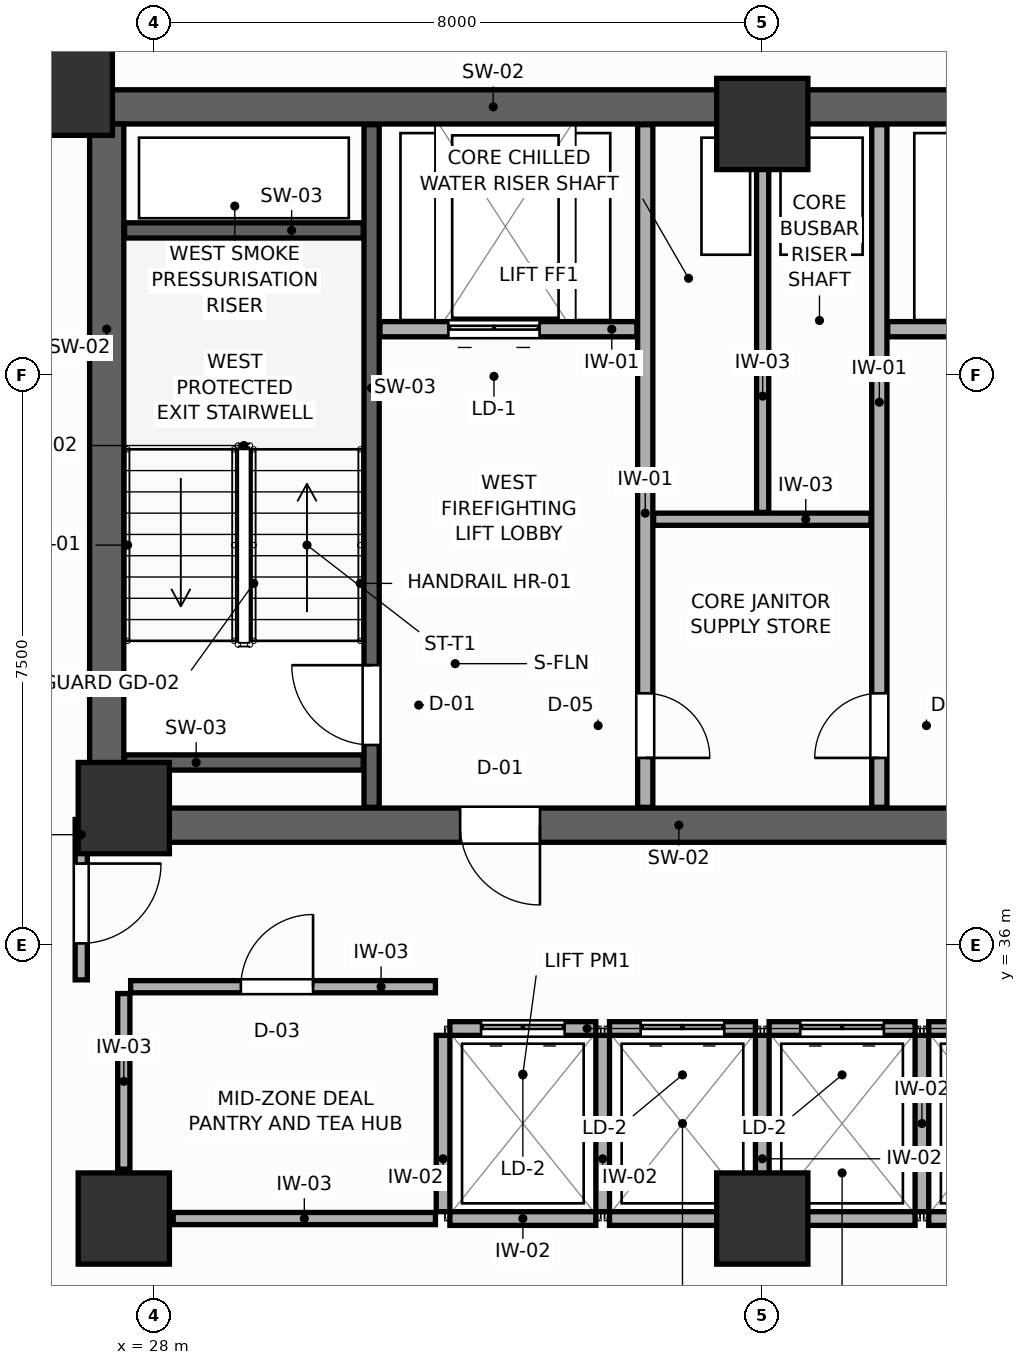
"""IFC4 building model, lengths in metres.
Left out: names, types, materials, properties, quantities, classifications, styles, units other than length and angle.
Written with IfcOpenShell. Run it as: python <this file> out.ifc"""

import sys

from ifc_helpers import new_model, si_unit, direction, frame, frame_2d, origin, origin_2d, place, context, subcontext, project, spatial, rectangle, extrude, source, transform, mapped, element, fill, save


model = new_model("IFC4")
c1 = context("Model", 3, precision=1e-05, world=origin(), true_north=direction((0.0, 1.0)))
c2 = subcontext(c1, "Body", "Model", "MODEL_VIEW")
j1 = project(units=[si_unit("LENGTHUNIT", "METRE"), si_unit("PLANEANGLEUNIT", "RADIAN")], contexts=[c1])
p1 = place(None, origin())
s1 = spatial("IfcSite", under=j1, at=p1, CompositionType="ELEMENT")
p2 = place(p1, origin())
s2 = spatial("IfcBuilding", under=s1, at=p2, CompositionType="ELEMENT")
p3 = place(p2, frame((0.0, 0.0, 168.6)))
s3 = spatial("IfcBuildingStorey", under=s2, at=p3, CompositionType="ELEMENT", Elevation=168.6)
p4 = place(p3, frame((27.15, 47.025, 0.0), z_axis=(0.0, 0.0, 1.0), x_axis=(1.0, 0.0, 0.0)))
e1 = element("IfcWall", 1, at=p4, inside=s3, PredefinedType="SHEAR", context=c2, shape_type="SweptSolid", body=[
    extrude(rectangle(XDim=17.7, YDim=0.45, at=frame_2d((8.85, 0.0))), origin(), (0.0, 0.0, 1.0), 3.6),
])
p5 = place(p3, frame((27.15, 37.575, 0.0), z_axis=(0.0, 0.0, 1.0), x_axis=(1.0, 0.0, 0.0)))
e2 = element("IfcWall", 2, at=p5, inside=s3, PredefinedType="SHEAR", context=c2, shape_type="SweptSolid", body=[
    extrude(rectangle(XDim=17.7, YDim=0.45, at=frame_2d((8.85, 0.0))), origin(), (0.0, 0.0, 1.0), 3.6),
])
p6 = place(p5, frame((4.875, 0.0, 0.0)))
e3 = element("IfcOpeningElement", 3, at=p6, cuts=e2, PredefinedType="OPENING", context=c2, shape_type="SweptSolid", body=[
    extrude(rectangle(XDim=1.05, YDim=2.1, at=frame_2d((0.525, 1.05))), frame((0.0, 0.235, 0.0), z_axis=(0.0, -1.0, 0.0), x_axis=(1.0, 0.0, 0.0)), (0.0, 0.0, 1.0), 0.47),
])
p7 = place(p5, frame((11.775, 0.0, 0.0)))
e4 = element("IfcOpeningElement", 4, at=p7, cuts=e2, PredefinedType="OPENING", context=c2, shape_type="SweptSolid", body=[
    extrude(rectangle(XDim=1.05, YDim=2.1, at=frame_2d((0.525, 1.05))), frame((0.0, 0.235, 0.0), z_axis=(0.0, -1.0, 0.0), x_axis=(1.0, 0.0, 0.0)), (0.0, 0.0, 1.0), 0.47),
])
p8 = place(p3, frame((27.375, 37.8, 0.0), z_axis=(0.0, 0.0, 1.0), x_axis=(0.0, 1.0, 0.0)))
e5 = element("IfcWall", 5, at=p8, inside=s3, PredefinedType="SHEAR", context=c2, shape_type="SweptSolid", body=[
    extrude(rectangle(XDim=9.0, YDim=0.45, at=frame_2d((4.5, 0.0))), origin(), (0.0, 0.0, 1.0), 3.6),
])
m1 = source(origin(), c2, "Body", "SweptSolid", [
    extrude(rectangle(XDim=1.2, YDim=1.2, at=origin_2d()), origin(), (0.0, 0.0, 1.0), 3.6),
])
for number, where, z_axis, x_axis in (
    (6, (26.85, 47.25, 0.0), (0.0, 0.0, 1.0), (1.0, 0.0, 0.0)),
    (7, (27.6, 37.8, 0.0), (0.0, 0.0, 1.0), (1.0, 0.0, 0.0)),
    (8, (27.6, 32.4, 0.0), (0.0, 0.0, 1.0), (1.0, 0.0, 0.0)),
    (9, (36.0, 46.8, 0.0), (0.0, 0.0, 1.0), (1.0, 0.0, 0.0)),
    (10, (36.0, 32.4, 0.0), (0.0, 0.0, 1.0), (1.0, 0.0, 0.0)),
):
    element("IfcColumn", number, at=place(p3, frame(where, z_axis=z_axis, x_axis=x_axis)), inside=s3, PredefinedType="COLUMN", context=c2, shape_type="MappedRepresentation", body=[
        mapped(m1, transform((0.0, 0.0, 0.0), scale=1.0)),
    ])
p9 = place(p3, frame((30.86, 37.81, 0.0), z_axis=(0.0, 0.0, 1.0), x_axis=(0.0, 1.0, 0.0)))
e11 = element("IfcWall", 11, at=p9, inside=s3, PredefinedType="SHEAR", context=c2, shape_type="SweptSolid", body=[
    extrude(rectangle(XDim=8.98, YDim=0.2, at=frame_2d((4.49, 0.0))), origin(), (0.0, 0.0, 1.0), 3.6),
])
p10 = place(p9, frame((0.82, 0.0, 0.0)))
e12 = element("IfcOpeningElement", 12, at=p10, cuts=e11, PredefinedType="OPENING", context=c2, shape_type="SweptSolid", body=[
    extrude(rectangle(XDim=1.05, YDim=2.1, at=frame_2d((0.525, 1.05))), frame((0.0, 0.11, 0.0), z_axis=(0.0, -1.0, 0.0), x_axis=(1.0, 0.0, 0.0)), (0.0, 0.0, 1.0), 0.22),
])
for number, where, z_axis, x_axis in (
    (13, (27.61, 45.4, 0.0), (0.0, 0.0, 1.0), (1.0, 0.0, 0.0)),
    (14, (27.61, 38.4, 0.0), (0.0, 0.0, 1.0), (1.0, 0.0, 0.0)),
):
    element("IfcWall", number, at=place(p3, frame(where, z_axis=z_axis, x_axis=x_axis)), inside=s3, PredefinedType="SHEAR", context=c2, shape_type="SweptSolid", body=[
        extrude(rectangle(XDim=3.14, YDim=0.2, at=frame_2d((1.57, 0.0))), origin(), (0.0, 0.0, 1.0), 3.6),
    ])
p11 = place(p3, frame((30.97, 44.1, 0.0), z_axis=(0.0, 0.0, 1.0), x_axis=(1.0, 0.0, 0.0)))
e15 = element("IfcWall", 15, at=p11, inside=s3, PredefinedType="PARTITIONING", context=c2, shape_type="SweptSolid", body=[
    extrude(rectangle(XDim=3.38, YDim=0.2, at=frame_2d((1.69, 0.0))), origin(), (0.0, 0.0, 1.0), 3.4),
])
p12 = place(p11, frame((0.9, 0.0, 0.0)))
e16 = element("IfcOpeningElement", 16, at=p12, cuts=e15, PredefinedType="OPENING", context=c2, shape_type="SweptSolid", body=[
    extrude(rectangle(XDim=1.2, YDim=2.1, at=frame_2d((0.6, 1.05))), frame((0.0, 0.11, 0.0), z_axis=(0.0, -1.0, 0.0), x_axis=(1.0, 0.0, 0.0)), (0.0, 0.0, 1.0), 0.22),
])
p13 = place(p3, frame((37.65, 44.1, 0.0), z_axis=(0.0, 0.0, 1.0), x_axis=(1.0, 0.0, 0.0)))
e17 = element("IfcWall", 17, at=p13, inside=s3, PredefinedType="PARTITIONING", context=c2, shape_type="SweptSolid", body=[
    extrude(rectangle(XDim=3.38, YDim=0.2, at=frame_2d((1.69, 0.0))), origin(), (0.0, 0.0, 1.0), 3.4),
])
p14 = place(p13, frame((1.0, 0.0, 0.0)))
e18 = element("IfcOpeningElement", 18, at=p14, cuts=e17, PredefinedType="OPENING", context=c2, shape_type="SweptSolid", body=[
    extrude(rectangle(XDim=1.2, YDim=2.1, at=frame_2d((0.6, 1.05))), frame((0.0, 0.11, 0.0), z_axis=(0.0, -1.0, 0.0), x_axis=(1.0, 0.0, 0.0)), (0.0, 0.0, 1.0), 0.22),
])
p15 = place(p3, frame((34.46, 37.81, 0.0), z_axis=(0.0, 0.0, 1.0), x_axis=(0.0, 1.0, 0.0)))
e19 = element("IfcWall", 19, at=p15, inside=s3, PredefinedType="PARTITIONING", context=c2, shape_type="SweptSolid", body=[
    extrude(rectangle(XDim=8.98, YDim=0.2, at=frame_2d((4.49, 0.0))), origin(), (0.0, 0.0, 1.0), 3.4),
])
p16 = place(p15, frame((0.65, 0.0, 0.0)))
e20 = element("IfcOpeningElement", 20, at=p16, cuts=e19, PredefinedType="OPENING", context=c2, shape_type="SweptSolid", body=[
    extrude(rectangle(XDim=0.85, YDim=2.05, at=frame_2d((0.425, 1.025))), frame((0.0, 0.11, 0.0), z_axis=(0.0, -1.0, 0.0), x_axis=(1.0, 0.0, 0.0)), (0.0, 0.0, 1.0), 0.22),
])
p17 = place(p3, frame((37.54, 37.81, 0.0), z_axis=(0.0, 0.0, 1.0), x_axis=(0.0, 1.0, 0.0)))
e21 = element("IfcWall", 21, at=p17, inside=s3, PredefinedType="PARTITIONING", context=c2, shape_type="SweptSolid", body=[
    extrude(rectangle(XDim=8.98, YDim=0.2, at=frame_2d((4.49, 0.0))), origin(), (0.0, 0.0, 1.0), 3.4),
])
p18 = place(p17, frame((0.65, 0.0, 0.0)))
e22 = element("IfcOpeningElement", 22, at=p18, cuts=e21, PredefinedType="OPENING", context=c2, shape_type="SweptSolid", body=[
    extrude(rectangle(XDim=0.85, YDim=2.05, at=frame_2d((0.425, 1.025))), frame((0.0, 0.11, 0.0), z_axis=(0.0, -1.0, 0.0), x_axis=(1.0, 0.0, 0.0)), (0.0, 0.0, 1.0), 0.22),
])
p19 = place(p3, frame((34.57, 41.6, 0.0), z_axis=(0.0, 0.0, 1.0), x_axis=(1.0, 0.0, 0.0)))
e23 = element("IfcWall", 23, at=p19, inside=s3, PredefinedType="PARTITIONING", context=c2, shape_type="SweptSolid", body=[
    extrude(rectangle(XDim=2.86, YDim=0.16, at=frame_2d((1.43, 0.0))), origin(), (0.0, 0.0, 1.0), 3.4),
])
p20 = place(p3, frame((36.005, 41.69, 0.0), z_axis=(0.0, 0.0, 1.0), x_axis=(0.0, 1.0, 0.0)))
e24 = element("IfcWall", 24, at=p20, inside=s3, PredefinedType="PARTITIONING", context=c2, shape_type="SweptSolid", body=[
    extrude(rectangle(XDim=5.1, YDim=0.16, at=frame_2d((2.55, 0.0))), origin(), (0.0, 0.0, 1.0), 3.4),
])
p21 = place(p3, frame((31.89, 34.9, 0.0), z_axis=(0.0, 0.0, 1.0), x_axis=(1.0, 0.0, 0.0)))
e25 = element("IfcWall", 25, at=p21, inside=s3, PredefinedType="PARTITIONING", context=c2, shape_type="SweptSolid", body=[
    extrude(rectangle(XDim=1.92, YDim=0.18, at=frame_2d((0.96, 0.0))), origin(), (0.0, 0.0, 1.0), 3.4),
])
p22 = place(p21, frame((0.41, 0.0, 0.0)))
e26 = element("IfcOpeningElement", 26, at=p22, cuts=e25, PredefinedType="OPENING", context=c2, shape_type="SweptSolid", body=[
    extrude(rectangle(XDim=1.1, YDim=2.1, at=frame_2d((0.55, 1.05))), frame((0.0, 0.1, 0.0), z_axis=(0.0, -1.0, 0.0), x_axis=(1.0, 0.0, 0.0)), (0.0, 0.0, 1.0), 0.2),
])
p23 = place(p3, frame((31.89, 32.4, 0.0), z_axis=(0.0, 0.0, 1.0), x_axis=(1.0, 0.0, 0.0)))
e27 = element("IfcWall", 27, at=p23, inside=s3, PredefinedType="PARTITIONING", context=c2, shape_type="SweptSolid", body=[
    extrude(rectangle(XDim=1.92, YDim=0.18, at=frame_2d((0.96, 0.0))), origin(), (0.0, 0.0, 1.0), 2.95),
])
p24 = place(p3, frame((31.8, 32.49, 0.0), z_axis=(0.0, 0.0, 1.0), x_axis=(0.0, 1.0, 0.0)))
e28 = element("IfcWall", 28, at=p24, inside=s3, PredefinedType="PARTITIONING", context=c2, shape_type="SweptSolid", body=[
    extrude(rectangle(XDim=2.32, YDim=0.18, at=frame_2d((1.16, 0.0))), origin(), (0.0, 0.0, 1.0), 3.4),
])
p25 = place(p3, frame((33.99, 34.9, 0.0), z_axis=(0.0, 0.0, 1.0), x_axis=(1.0, 0.0, 0.0)))
e29 = element("IfcWall", 29, at=p25, inside=s3, PredefinedType="PARTITIONING", context=c2, shape_type="SweptSolid", body=[
    extrude(rectangle(XDim=1.92, YDim=0.18, at=frame_2d((0.96, 0.0))), origin(), (0.0, 0.0, 1.0), 3.4),
])
p26 = place(p25, frame((0.41, 0.0, 0.0)))
e30 = element("IfcOpeningElement", 30, at=p26, cuts=e29, PredefinedType="OPENING", context=c2, shape_type="SweptSolid", body=[
    extrude(rectangle(XDim=1.1, YDim=2.1, at=frame_2d((0.55, 1.05))), frame((0.0, 0.1, 0.0), z_axis=(0.0, -1.0, 0.0), x_axis=(1.0, 0.0, 0.0)), (0.0, 0.0, 1.0), 0.2),
])
p27 = place(p3, frame((33.99, 32.4, 0.0), z_axis=(0.0, 0.0, 1.0), x_axis=(1.0, 0.0, 0.0)))
e31 = element("IfcWall", 31, at=p27, inside=s3, PredefinedType="PARTITIONING", context=c2, shape_type="SweptSolid", body=[
    extrude(rectangle(XDim=1.92, YDim=0.18, at=frame_2d((0.96, 0.0))), origin(), (0.0, 0.0, 1.0), 2.95),
])
p28 = place(p3, frame((33.9, 32.49, 0.0), z_axis=(0.0, 0.0, 1.0), x_axis=(0.0, 1.0, 0.0)))
e32 = element("IfcWall", 32, at=p28, inside=s3, PredefinedType="PARTITIONING", context=c2, shape_type="SweptSolid", body=[
    extrude(rectangle(XDim=2.32, YDim=0.18, at=frame_2d((1.16, 0.0))), origin(), (0.0, 0.0, 1.0), 3.4),
])
p29 = place(p3, frame((36.09, 34.9, 0.0), z_axis=(0.0, 0.0, 1.0), x_axis=(1.0, 0.0, 0.0)))
e33 = element("IfcWall", 33, at=p29, inside=s3, PredefinedType="PARTITIONING", context=c2, shape_type="SweptSolid", body=[
    extrude(rectangle(XDim=1.92, YDim=0.18, at=frame_2d((0.96, 0.0))), origin(), (0.0, 0.0, 1.0), 3.4),
])
p30 = place(p29, frame((0.41, 0.0, 0.0)))
e34 = element("IfcOpeningElement", 34, at=p30, cuts=e33, PredefinedType="OPENING", context=c2, shape_type="SweptSolid", body=[
    extrude(rectangle(XDim=1.1, YDim=2.1, at=frame_2d((0.55, 1.05))), frame((0.0, 0.1, 0.0), z_axis=(0.0, -1.0, 0.0), x_axis=(1.0, 0.0, 0.0)), (0.0, 0.0, 1.0), 0.2),
])
p31 = place(p3, frame((36.09, 32.4, 0.0), z_axis=(0.0, 0.0, 1.0), x_axis=(1.0, 0.0, 0.0)))
e35 = element("IfcWall", 35, at=p31, inside=s3, PredefinedType="PARTITIONING", context=c2, shape_type="SweptSolid", body=[
    extrude(rectangle(XDim=1.92, YDim=0.18, at=frame_2d((0.96, 0.0))), origin(), (0.0, 0.0, 1.0), 2.95),
])
p32 = place(p3, frame((36.0, 32.49, 0.0), z_axis=(0.0, 0.0, 1.0), x_axis=(0.0, 1.0, 0.0)))
e36 = element("IfcWall", 36, at=p32, inside=s3, PredefinedType="PARTITIONING", context=c2, shape_type="SweptSolid", body=[
    extrude(rectangle(XDim=2.32, YDim=0.18, at=frame_2d((1.16, 0.0))), origin(), (0.0, 0.0, 1.0), 3.4),
])
p33 = place(p3, frame((38.19, 34.9, 0.0), z_axis=(0.0, 0.0, 1.0), x_axis=(1.0, 0.0, 0.0)))
e37 = element("IfcWall", 37, at=p33, inside=s3, PredefinedType="PARTITIONING", context=c2, shape_type="SweptSolid", body=[
    extrude(rectangle(XDim=1.92, YDim=0.18, at=frame_2d((0.96, 0.0))), origin(), (0.0, 0.0, 1.0), 3.4),
])
p34 = place(p33, frame((0.41, 0.0, 0.0)))
e38 = element("IfcOpeningElement", 38, at=p34, cuts=e37, PredefinedType="OPENING", context=c2, shape_type="SweptSolid", body=[
    extrude(rectangle(XDim=1.1, YDim=2.1, at=frame_2d((0.55, 1.05))), frame((0.0, 0.1, 0.0), z_axis=(0.0, -1.0, 0.0), x_axis=(1.0, 0.0, 0.0)), (0.0, 0.0, 1.0), 0.2),
])
p35 = place(p3, frame((38.19, 32.4, 0.0), z_axis=(0.0, 0.0, 1.0), x_axis=(1.0, 0.0, 0.0)))
e39 = element("IfcWall", 39, at=p35, inside=s3, PredefinedType="PARTITIONING", context=c2, shape_type="SweptSolid", body=[
    extrude(rectangle(XDim=1.92, YDim=0.18, at=frame_2d((0.96, 0.0))), origin(), (0.0, 0.0, 1.0), 2.95),
])
p36 = place(p3, frame((38.1, 32.49, 0.0), z_axis=(0.0, 0.0, 1.0), x_axis=(0.0, 1.0, 0.0)))
e40 = element("IfcWall", 40, at=p36, inside=s3, PredefinedType="PARTITIONING", context=c2, shape_type="SweptSolid", body=[
    extrude(rectangle(XDim=2.32, YDim=0.18, at=frame_2d((1.16, 0.0))), origin(), (0.0, 0.0, 1.0), 3.4),
])
p37 = place(p3, frame((28.25, 32.4, 0.0), z_axis=(0.0, 0.0, 1.0), x_axis=(1.0, 0.0, 0.0)))
e41 = element("IfcWall", 41, at=p37, inside=s3, PredefinedType="PARTITIONING", context=c2, shape_type="SweptSolid", body=[
    extrude(rectangle(XDim=3.45, YDim=0.16, at=frame_2d((1.725, 0.0))), origin(), (0.0, 0.0, 1.0), 2.95),
])
p38 = place(p3, frame((27.6, 33.05, 0.0), z_axis=(0.0, 0.0, 1.0), x_axis=(0.0, 1.0, 0.0)))
e42 = element("IfcWall", 42, at=p38, inside=s3, PredefinedType="PARTITIONING", context=c2, shape_type="SweptSolid", body=[
    extrude(rectangle(XDim=2.31, YDim=0.16, at=frame_2d((1.155, 0.0))), origin(), (0.0, 0.0, 1.0), 3.4),
])
p39 = place(p3, frame((27.69, 35.45, 0.0), z_axis=(0.0, 0.0, 1.0), x_axis=(1.0, 0.0, 0.0)))
e43 = element("IfcWall", 43, at=p39, inside=s3, PredefinedType="PARTITIONING", context=c2, shape_type="SweptSolid", body=[
    extrude(rectangle(XDim=4.01, YDim=0.16, at=frame_2d((2.005, 0.0))), origin(), (0.0, 0.0, 1.0), 3.4),
])
p40 = place(p39, frame((1.45, 0.0, 0.0)))
e44 = element("IfcOpeningElement", 44, at=p40, cuts=e43, PredefinedType="OPENING", context=c2, shape_type="SweptSolid", body=[
    extrude(rectangle(XDim=0.95, YDim=2.05, at=frame_2d((0.475, 1.025))), frame((0.0, 0.09, 0.0), z_axis=(0.0, -1.0, 0.0), x_axis=(1.0, 0.0, 0.0)), (0.0, 0.0, 1.0), 0.18),
])
p41 = place(p3, frame((27.04, 35.54, 0.0), z_axis=(0.0, 0.0, 1.0), x_axis=(0.0, 1.0, 0.0)))
e45 = element("IfcWall", 45, at=p41, inside=s3, PredefinedType="PARTITIONING", context=c2, shape_type="SweptSolid", body=[
    extrude(rectangle(XDim=2.11, YDim=0.16, at=frame_2d((1.055, 0.0))), origin(), (0.0, 0.0, 1.0), 3.4),
])
p42 = place(p41, frame((0.48, 0.0, 0.0)))
e46 = element("IfcOpeningElement", 46, at=p42, cuts=e45, PredefinedType="OPENING", context=c2, shape_type="SweptSolid", body=[
    extrude(rectangle(XDim=1.05, YDim=2.1, at=frame_2d((0.525, 1.05))), frame((0.0, 0.09, 0.0), z_axis=(0.0, -1.0, 0.0), x_axis=(1.0, 0.0, 0.0)), (0.0, 0.0, 1.0), 0.18),
])
p43 = place(p3, frame((27.035, 47.34, 0.0), z_axis=(0.0, 0.0, 1.0), x_axis=(0.0, 1.0, 0.0)))
e47 = element("IfcWall", 47, at=p43, inside=s3, PredefinedType="PARTITIONING", context=c2, shape_type="SweptSolid", body=[
    extrude(rectangle(XDim=4.518, YDim=0.16, at=frame_2d((2.259, 0.0))), origin(), (0.0, 0.0, 1.0), 3.4),
])
p44 = place(p43, frame((2.663, 0.0, 0.0)))
e48 = element("IfcOpeningElement", 48, at=p44, cuts=e47, PredefinedType="OPENING", context=c2, shape_type="SweptSolid", body=[
    extrude(rectangle(XDim=0.95, YDim=2.05, at=frame_2d((0.475, 1.025))), frame((0.0, 0.09, 0.0), z_axis=(0.0, -1.0, 0.0), x_axis=(1.0, 0.0, 0.0)), (0.0, 0.0, 1.0), 0.18),
])
p45 = place(p10, origin())
e49 = element("IfcDoor", 49, at=p45, inside=s3, OperationType="SINGLE_SWING_RIGHT", PredefinedType="DOOR", context=c2, shape_type="SweptSolid", body=[
    extrude(rectangle(XDim=1.05, YDim=2.1, at=frame_2d((0.525, 1.05))), frame((0.0, 0.025, 0.0), z_axis=(0.0, -1.0, 0.0), x_axis=(1.0, 0.0, 0.0)), (0.0, 0.0, 1.0), 0.05),
])
fill(e12, e49)
p46 = place(p12, origin())
e50 = element("IfcDoor", 50, at=p46, inside=s3, OperationType="DOUBLE_DOOR_SLIDING", PredefinedType="DOOR", context=c2, shape_type="SweptSolid", body=[
    extrude(rectangle(XDim=1.2, YDim=2.1, at=frame_2d((0.6, 1.05))), frame((0.0, 0.025, 0.0), z_axis=(0.0, -1.0, 0.0), x_axis=(1.0, 0.0, 0.0)), (0.0, 0.0, 1.0), 0.05),
])
fill(e16, e50)
p47 = place(p16, frame((0.85, 0.0, 0.0), z_axis=(0.0, 0.0, 1.0), x_axis=(-1.0, 0.0, 0.0)))
e51 = element("IfcDoor", 51, at=p47, inside=s3, OperationType="SINGLE_SWING_RIGHT", PredefinedType="DOOR", context=c2, shape_type="SweptSolid", body=[
    extrude(rectangle(XDim=0.85, YDim=2.05, at=frame_2d((0.425, 1.025))), frame((0.0, 0.025, 0.0), z_axis=(0.0, -1.0, 0.0), x_axis=(1.0, 0.0, 0.0)), (0.0, 0.0, 1.0), 0.05),
])
fill(e20, e51)
p48 = place(p18, origin())
e52 = element("IfcDoor", 52, at=p48, inside=s3, OperationType="SINGLE_SWING_LEFT", PredefinedType="DOOR", context=c2, shape_type="SweptSolid", body=[
    extrude(rectangle(XDim=0.85, YDim=2.05, at=frame_2d((0.425, 1.025))), frame((0.0, 0.025, 0.0), z_axis=(0.0, -1.0, 0.0), x_axis=(1.0, 0.0, 0.0)), (0.0, 0.0, 1.0), 0.05),
])
fill(e22, e52)
p49 = place(p22, origin())
e53 = element("IfcDoor", 53, at=p49, inside=s3, OperationType="DOUBLE_DOOR_SLIDING", PredefinedType="DOOR", context=c2, shape_type="SweptSolid", body=[
    extrude(rectangle(XDim=1.1, YDim=2.1, at=frame_2d((0.55, 1.05))), frame((0.0, 0.025, 0.0), z_axis=(0.0, -1.0, 0.0), x_axis=(1.0, 0.0, 0.0)), (0.0, 0.0, 1.0), 0.05),
])
fill(e26, e53)
p50 = place(p26, origin())
e54 = element("IfcDoor", 54, at=p50, inside=s3, OperationType="DOUBLE_DOOR_SLIDING", PredefinedType="DOOR", context=c2, shape_type="SweptSolid", body=[
    extrude(rectangle(XDim=1.1, YDim=2.1, at=frame_2d((0.55, 1.05))), frame((0.0, 0.025, 0.0), z_axis=(0.0, -1.0, 0.0), x_axis=(1.0, 0.0, 0.0)), (0.0, 0.0, 1.0), 0.05),
])
fill(e30, e54)
p51 = place(p30, origin())
e55 = element("IfcDoor", 55, at=p51, inside=s3, OperationType="DOUBLE_DOOR_SLIDING", PredefinedType="DOOR", context=c2, shape_type="SweptSolid", body=[
    extrude(rectangle(XDim=1.1, YDim=2.1, at=frame_2d((0.55, 1.05))), frame((0.0, 0.025, 0.0), z_axis=(0.0, -1.0, 0.0), x_axis=(1.0, 0.0, 0.0)), (0.0, 0.0, 1.0), 0.05),
])
fill(e34, e55)
p52 = place(p40, origin())
e56 = element("IfcDoor", 56, at=p52, inside=s3, OperationType="SINGLE_SWING_RIGHT", PredefinedType="DOOR", context=c2, shape_type="SweptSolid", body=[
    extrude(rectangle(XDim=0.95, YDim=2.05, at=frame_2d((0.475, 1.025))), frame((0.0, 0.025, 0.0), z_axis=(0.0, -1.0, 0.0), x_axis=(1.0, 0.0, 0.0)), (0.0, 0.0, 1.0), 0.05),
])
fill(e44, e56)
p53 = place(p42, frame((1.05, 0.0, 0.0), z_axis=(0.0, 0.0, 1.0), x_axis=(-1.0, 0.0, 0.0)))
e57 = element("IfcDoor", 57, at=p53, inside=s3, OperationType="SINGLE_SWING_LEFT", PredefinedType="DOOR", context=c2, shape_type="SweptSolid", body=[
    extrude(rectangle(XDim=1.05, YDim=2.1, at=frame_2d((0.525, 1.05))), frame((0.0, 0.025, 0.0), z_axis=(0.0, -1.0, 0.0), x_axis=(1.0, 0.0, 0.0)), (0.0, 0.0, 1.0), 0.05),
])
fill(e46, e57)
p54 = place(p6, frame((1.05, 0.0, 0.0), z_axis=(0.0, 0.0, 1.0), x_axis=(-1.0, 0.0, 0.0)))
e58 = element("IfcDoor", 58, at=p54, inside=s3, OperationType="SINGLE_SWING_LEFT", PredefinedType="DOOR", context=c2, shape_type="SweptSolid", body=[
    extrude(rectangle(XDim=1.05, YDim=2.1, at=frame_2d((0.525, 1.05))), frame((0.0, 0.025, 0.0), z_axis=(0.0, -1.0, 0.0), x_axis=(1.0, 0.0, 0.0)), (0.0, 0.0, 1.0), 0.05),
])
fill(e3, e58)
save(model, sys.argv[1])
